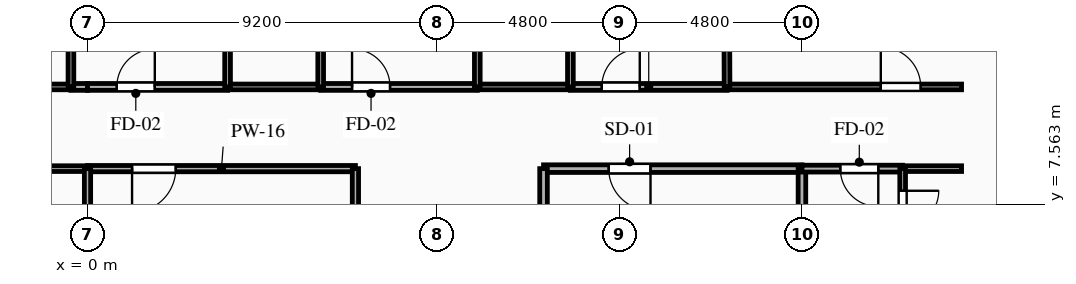
"""IFC4 building model, lengths in metres.
Left out: names, types, materials, properties, quantities, classifications, styles, units other than length and angle.
Written with IfcOpenShell. Run it as: python <this file> out.ifc"""

import sys

from ifc_helpers import new_model, si_unit, direction, frame, frame_2d, origin, place, context, subcontext, project, spatial, rectangle, extrude, element, fill, save


model = new_model("IFC4")
c1 = context("Model", 3, precision=1e-05, world=origin(), true_north=direction((0.0, 1.0)))
c2 = subcontext(c1, "Body", "Model", "MODEL_VIEW")
j1 = project(units=[si_unit("LENGTHUNIT", "METRE"), si_unit("PLANEANGLEUNIT", "RADIAN")], contexts=[c1])
p1 = place(None, origin())
s1 = spatial("IfcSite", under=j1, at=p1, CompositionType="ELEMENT")
p2 = place(p1, origin())
s2 = spatial("IfcBuilding", under=s1, at=p2, CompositionType="ELEMENT")
p3 = place(p2, frame((0.0, 0.0, 82.35)))
s3 = spatial("IfcBuildingStorey", under=s2, at=p3, CompositionType="ELEMENT", Elevation=82.35)
p4 = place(p3, frame((18.8, 8.5, 0.0), z_axis=(0.0, 0.0, 1.0), x_axis=(-1.0, 0.0, 0.0)))
e1 = element("IfcWall", 1, at=p4, inside=s3, PredefinedType="PARTITIONING", context=c2, shape_type="SweptSolid", body=[
    extrude(rectangle(XDim=6.8, YDim=0.2, at=frame_2d((3.4, 0.0))), origin(), (0.0, 0.0, 1.0), 3.045),
])
p5 = place(p4, frame((3.985, 0.0, 0.0)))
e2 = element("IfcOpeningElement", 2, at=p5, cuts=e1, PredefinedType="OPENING", context=c2, shape_type="SweptSolid", body=[
    extrude(rectangle(XDim=1.1, YDim=2.15, at=frame_2d((0.55, 1.075))), frame((0.0, 0.11, 0.0), z_axis=(0.0, -1.0, 0.0), x_axis=(1.0, 0.0, 0.0)), (0.0, 0.0, 1.0), 0.22),
])
p6 = place(p3, frame((12.0, 8.5, 0.0), z_axis=(0.0, 0.0, 1.0), x_axis=(0.0, -1.0, 0.0)))
e3 = element("IfcWall", 3, at=p6, inside=s3, PredefinedType="PARTITIONING", context=c2, shape_type="SweptSolid", body=[
    extrude(rectangle(XDim=2.9, YDim=0.2, at=frame_2d((1.45, 0.0))), origin(), (0.0, 0.0, 1.0), 3.045),
])
p7 = place(p3, frame((18.8, 5.6, 0.0), z_axis=(0.0, 0.0, 1.0), x_axis=(0.0, 1.0, 0.0)))
e4 = element("IfcWall", 4, at=p7, inside=s3, PredefinedType="PARTITIONING", context=c2, shape_type="SweptSolid", body=[
    extrude(rectangle(XDim=2.9, YDim=0.2, at=frame_2d((1.45, 0.0))), origin(), (0.0, 0.0, 1.0), 2.53),
])
p8 = place(p3, frame((-0.436, 10.65, 0.0), z_axis=(0.0, 0.0, 1.0), x_axis=(1.0, 0.0, 0.0)))
e5 = element("IfcWall", 5, at=p8, inside=s3, PredefinedType="PARTITIONING", context=c2, shape_type="SweptSolid", body=[
    extrude(rectangle(XDim=0.436, YDim=0.18, at=frame_2d((0.218, 0.0))), origin(), (0.0, 0.0, 1.0), 3.045),
])
p9 = place(p3, frame((-2.886, 10.65, 0.0), z_axis=(0.0, 0.0, 1.0), x_axis=(1.0, 0.0, 0.0)))
e6 = element("IfcWall", 6, at=p9, inside=s3, PredefinedType="PLUMBINGWALL", context=c2, shape_type="SweptSolid", body=[
    extrude(rectangle(XDim=2.45, YDim=0.15, at=frame_2d((1.225, 0.0))), origin(), (0.0, 0.0, 1.0), 3.045),
])
p10 = place(p3, frame((0.0, 8.5, 0.0), z_axis=(0.0, 0.0, 1.0), x_axis=(-1.0, 0.0, 0.0)))
e7 = element("IfcWall", 7, at=p10, inside=s3, PredefinedType="PARTITIONING", context=c2, shape_type="SweptSolid", body=[
    extrude(rectangle(XDim=7.05, YDim=0.15, at=frame_2d((3.525, 0.0))), origin(), (0.0, 0.0, 1.0), 3.045),
])
p11 = place(p3, frame((21.45, 8.5, 0.0), z_axis=(0.0, 0.0, 1.0), x_axis=(-1.0, 0.0, 0.0)))
e8 = element("IfcWall", 8, at=p11, inside=s3, PredefinedType="PARTITIONING", context=c2, shape_type="SweptSolid", body=[
    extrude(rectangle(XDim=2.65, YDim=0.18, at=frame_2d((1.325, 0.0))), origin(), (0.0, 0.0, 1.0), 3.045),
])
p12 = place(p11, frame((0.641, 0.0, 0.0)))
e9 = element("IfcOpeningElement", 9, at=p12, cuts=e8, PredefinedType="OPENING", context=c2, shape_type="SweptSolid", body=[
    extrude(rectangle(XDim=1.0, YDim=2.15, at=frame_2d((0.5, 1.075))), frame((0.0, 0.1, 0.0), z_axis=(0.0, -1.0, 0.0), x_axis=(1.0, 0.0, 0.0)), (0.0, 0.0, 1.0), 0.2),
])
p13 = place(p3, frame((23.0, 8.5, 0.0), z_axis=(0.0, 0.0, 1.0), x_axis=(-1.0, 0.0, 0.0)))
e10 = element("IfcWall", 10, at=p13, inside=s3, PredefinedType="PARTITIONING", context=c2, shape_type="SweptSolid", body=[
    extrude(rectangle(XDim=1.55, YDim=0.15, at=frame_2d((0.775, 0.0))), origin(), (0.0, 0.0, 1.0), 3.045),
])
p14 = place(p3, frame((0.0, 10.65, 0.0), z_axis=(0.0, 0.0, 1.0), x_axis=(1.0, 0.0, 0.0)))
e11 = element("IfcWall", 11, at=p14, inside=s3, PredefinedType="PARTITIONING", context=c2, shape_type="SweptSolid", body=[
    extrude(rectangle(XDim=3.686, YDim=0.18, at=frame_2d((1.843, 0.0))), origin(), (0.0, 0.0, 1.0), 3.045),
])
p15 = place(p14, frame((0.771, 0.0, 0.0)))
e12 = element("IfcOpeningElement", 12, at=p15, cuts=e11, PredefinedType="OPENING", context=c2, shape_type="SweptSolid", body=[
    extrude(rectangle(XDim=1.0, YDim=2.15, at=frame_2d((0.5, 1.075))), frame((0.0, 0.1, 0.0), z_axis=(0.0, -1.0, 0.0), x_axis=(1.0, 0.0, 0.0)), (0.0, 0.0, 1.0), 0.2),
])
p16 = place(p3, frame((6.136, 10.65, 0.0), z_axis=(0.0, 0.0, 1.0), x_axis=(1.0, 0.0, 0.0)))
e13 = element("IfcWall", 13, at=p16, inside=s3, PredefinedType="PARTITIONING", context=c2, shape_type="SweptSolid", body=[
    extrude(rectangle(XDim=4.121, YDim=0.18, at=frame_2d((2.061, 0.0))), origin(), (0.0, 0.0, 1.0), 3.045),
])
p17 = place(p16, frame((0.825, 0.0, 0.0)))
e14 = element("IfcOpeningElement", 14, at=p17, cuts=e13, PredefinedType="OPENING", context=c2, shape_type="SweptSolid", body=[
    extrude(rectangle(XDim=1.0, YDim=2.15, at=frame_2d((0.5, 1.075))), frame((0.0, 0.1, 0.0), z_axis=(0.0, -1.0, 0.0), x_axis=(1.0, 0.0, 0.0)), (0.0, 0.0, 1.0), 0.2),
])
p18 = place(p3, frame((3.686, 10.65, 0.0), z_axis=(0.0, 0.0, 1.0), x_axis=(1.0, 0.0, 0.0)))
e15 = element("IfcWall", 15, at=p18, inside=s3, PredefinedType="PLUMBINGWALL", context=c2, shape_type="SweptSolid", body=[
    extrude(rectangle(XDim=2.45, YDim=0.15, at=frame_2d((1.225, 0.0))), origin(), (0.0, 0.0, 1.0), 3.045),
])
p19 = place(p3, frame((12.707, 10.65, 0.0), z_axis=(0.0, 0.0, 1.0), x_axis=(1.0, 0.0, 0.0)))
e16 = element("IfcWall", 16, at=p19, inside=s3, PredefinedType="PARTITIONING", context=c2, shape_type="SweptSolid", body=[
    extrude(rectangle(XDim=4.122, YDim=0.18, at=frame_2d((2.061, 0.0))), origin(), (0.0, 0.0, 1.0), 3.045),
])
p20 = place(p19, frame((0.825, 0.0, 0.0)))
e17 = element("IfcOpeningElement", 17, at=p20, cuts=e16, PredefinedType="OPENING", context=c2, shape_type="SweptSolid", body=[
    extrude(rectangle(XDim=1.0, YDim=2.15, at=frame_2d((0.5, 1.075))), frame((0.0, 0.1, 0.0), z_axis=(0.0, -1.0, 0.0), x_axis=(1.0, 0.0, 0.0)), (0.0, 0.0, 1.0), 0.2),
])
p21 = place(p3, frame((10.257, 10.65, 0.0), z_axis=(0.0, 0.0, 1.0), x_axis=(1.0, 0.0, 0.0)))
e18 = element("IfcWall", 18, at=p21, inside=s3, PredefinedType="PLUMBINGWALL", context=c2, shape_type="SweptSolid", body=[
    extrude(rectangle(XDim=2.45, YDim=0.15, at=frame_2d((1.225, 0.0))), origin(), (0.0, 0.0, 1.0), 3.045),
])
p22 = place(p3, frame((16.829, 10.65, 0.0), z_axis=(0.0, 0.0, 1.0), x_axis=(1.0, 0.0, 0.0)))
e19 = element("IfcWall", 19, at=p22, inside=s3, PredefinedType="PARTITIONING", context=c2, shape_type="SweptSolid", body=[
    extrude(rectangle(XDim=6.171, YDim=0.15, at=frame_2d((3.085, 0.0))), origin(), (0.0, 0.0, 1.0), 3.045),
])
p23 = place(p22, frame((4.046, 0.0, 0.0)))
e20 = element("IfcOpeningElement", 20, at=p23, cuts=e19, PredefinedType="OPENING", context=c2, shape_type="SweptSolid", body=[
    extrude(rectangle(XDim=1.05, YDim=2.15, at=frame_2d((0.525, 1.075))), frame((0.0, 0.085, 0.0), z_axis=(0.0, -1.0, 0.0), x_axis=(1.0, 0.0, 0.0)), (0.0, 0.0, 1.0), 0.17),
])
p24 = place(p3, frame((7.05, 8.5, 0.0), z_axis=(0.0, 0.0, 1.0), x_axis=(-1.0, 0.0, 0.0)))
e21 = element("IfcWall", 21, at=p24, inside=s3, PredefinedType="PARTITIONING", context=c2, shape_type="SweptSolid", body=[
    extrude(rectangle(XDim=7.05, YDim=0.165, at=frame_2d((3.525, 0.0))), origin(), (0.0, 0.0, 1.0), 3.045),
])
p25 = place(p24, frame((4.728, 0.0, 0.0)))
e22 = element("IfcOpeningElement", 22, at=p25, cuts=e21, PredefinedType="OPENING", context=c2, shape_type="SweptSolid", body=[
    extrude(rectangle(XDim=1.15, YDim=2.15, at=frame_2d((0.575, 1.075))), frame((0.0, 0.093, 0.0), z_axis=(0.0, -1.0, 0.0), x_axis=(1.0, 0.0, 0.0)), (0.0, 0.0, 1.0), 0.185),
])
p26 = place(p3, frame((7.05, 1.45, 0.0), z_axis=(0.0, 0.0, 1.0), x_axis=(0.0, 1.0, 0.0)))
e23 = element("IfcWall", 23, at=p26, inside=s3, PredefinedType="PARTITIONING", context=c2, shape_type="SweptSolid", body=[
    extrude(rectangle(XDim=7.05, YDim=0.165, at=frame_2d((3.525, 0.0))), origin(), (0.0, 0.0, 1.0), 3.045),
])
p27 = place(p3, frame((21.45, 8.5, 0.0), z_axis=(0.0, 0.0, 1.0), x_axis=(0.0, -1.0, 0.0)))
e24 = element("IfcWall", 24, at=p27, inside=s3, PredefinedType="PARTITIONING", context=c2, shape_type="SweptSolid", body=[
    extrude(rectangle(XDim=2.115, YDim=0.15, at=frame_2d((1.058, 0.0))), origin(), (0.0, 0.0, 1.0), 3.045),
])
p28 = place(p27, frame((0.583, 0.0, 0.0)))
e25 = element("IfcOpeningElement", 25, at=p28, cuts=e24, PredefinedType="OPENING", context=c2, shape_type="SweptSolid", body=[
    extrude(rectangle(XDim=0.95, YDim=2.1, at=frame_2d((0.475, 1.05))), frame((0.0, 0.085, 0.0), z_axis=(0.0, -1.0, 0.0), x_axis=(1.0, 0.0, 0.0)), (0.0, 0.0, 1.0), 0.17),
])
for number, where, z_axis, x_axis in (
    (26, (-0.436, 10.65, 0.0), (0.0, 0.0, 1.0), (0.0, 1.0, 0.0)),
    (27, (3.686, 12.8, 0.0), (0.0, 0.0, 1.0), (0.0, -1.0, 0.0)),
    (28, (6.136, 10.65, 0.0), (0.0, 0.0, 1.0), (0.0, 1.0, 0.0)),
    (29, (10.257, 12.8, 0.0), (0.0, 0.0, 1.0), (0.0, -1.0, 0.0)),
    (30, (12.707, 10.65, 0.0), (0.0, 0.0, 1.0), (0.0, 1.0, 0.0)),
):
    element("IfcWall", number, at=place(p3, frame(where, z_axis=z_axis, x_axis=x_axis)), inside=s3, PredefinedType="PLUMBINGWALL", context=c2, shape_type="SweptSolid", body=[
        extrude(rectangle(XDim=2.15, YDim=0.15, at=frame_2d((1.075, 0.0))), origin(), (0.0, 0.0, 1.0), 3.045),
    ])
p29 = place(p3, frame((16.785, 22.199, 0.0), z_axis=(0.0, 0.0, 1.0), x_axis=(0.003805067053, -0.999992760706, 0.0)))
e31 = element("IfcWall", 31, at=p29, inside=s3, PredefinedType="PARTITIONING", context=c2, shape_type="SweptSolid", body=[
    extrude(rectangle(XDim=11.549, YDim=0.15, at=frame_2d((5.774, 0.0))), origin(), (0.0, 0.0, 1.0), 3.045),
])
p30 = place(p3, frame((0.0, 8.5, 0.0), z_axis=(0.0, 0.0, 1.0), x_axis=(0.0, -1.0, 0.0)))
e32 = element("IfcWall", 32, at=p30, inside=s3, PredefinedType="PARTITIONING", context=c2, shape_type="SweptSolid", body=[
    extrude(rectangle(XDim=7.05, YDim=0.165, at=frame_2d((3.525, 0.0))), origin(), (0.0, 0.0, 1.0), 3.045),
])
p31 = place(p5, origin())
e33 = element("IfcDoor", 33, at=p31, inside=s3, OperationType="SINGLE_SWING_LEFT", PredefinedType="DOOR", context=c2, shape_type="SweptSolid", body=[
    extrude(rectangle(XDim=1.1, YDim=2.15, at=frame_2d((0.55, 1.075))), frame((0.0, 0.025, 0.0), z_axis=(0.0, -1.0, 0.0), x_axis=(1.0, 0.0, 0.0)), (0.0, 0.0, 1.0), 0.05),
])
fill(e2, e33)
p32 = place(p12, origin())
e34 = element("IfcDoor", 34, at=p32, inside=s3, OperationType="SINGLE_SWING_LEFT", PredefinedType="DOOR", context=c2, shape_type="SweptSolid", body=[
    extrude(rectangle(XDim=1.0, YDim=2.15, at=frame_2d((0.5, 1.075))), frame((0.0, 0.025, 0.0), z_axis=(0.0, -1.0, 0.0), x_axis=(1.0, 0.0, 0.0)), (0.0, 0.0, 1.0), 0.05),
])
fill(e9, e34)
p33 = place(p15, origin())
e35 = element("IfcDoor", 35, at=p33, inside=s3, OperationType="SINGLE_SWING_RIGHT", PredefinedType="DOOR", context=c2, shape_type="SweptSolid", body=[
    extrude(rectangle(XDim=1.0, YDim=2.15, at=frame_2d((0.5, 1.075))), frame((0.0, 0.025, 0.0), z_axis=(0.0, -1.0, 0.0), x_axis=(1.0, 0.0, 0.0)), (0.0, 0.0, 1.0), 0.05),
])
fill(e12, e35)
p34 = place(p17, origin())
e36 = element("IfcDoor", 36, at=p34, inside=s3, OperationType="SINGLE_SWING_LEFT", PredefinedType="DOOR", context=c2, shape_type="SweptSolid", body=[
    extrude(rectangle(XDim=1.0, YDim=2.15, at=frame_2d((0.5, 1.075))), frame((0.0, 0.025, 0.0), z_axis=(0.0, -1.0, 0.0), x_axis=(1.0, 0.0, 0.0)), (0.0, 0.0, 1.0), 0.05),
])
fill(e14, e36)
p35 = place(p20, origin())
e37 = element("IfcDoor", 37, at=p35, inside=s3, OperationType="SINGLE_SWING_RIGHT", PredefinedType="DOOR", context=c2, shape_type="SweptSolid", body=[
    extrude(rectangle(XDim=1.0, YDim=2.15, at=frame_2d((0.5, 1.075))), frame((0.0, 0.025, 0.0), z_axis=(0.0, -1.0, 0.0), x_axis=(1.0, 0.0, 0.0)), (0.0, 0.0, 1.0), 0.05),
])
fill(e17, e37)
p36 = place(p23, origin())
e38 = element("IfcDoor", 38, at=p36, inside=s3, OperationType="SINGLE_SWING_LEFT", PredefinedType="DOOR", context=c2, shape_type="SweptSolid", body=[
    extrude(rectangle(XDim=1.05, YDim=2.15, at=frame_2d((0.525, 1.075))), frame((0.0, 0.025, 0.0), z_axis=(0.0, -1.0, 0.0), x_axis=(1.0, 0.0, 0.0)), (0.0, 0.0, 1.0), 0.05),
])
fill(e20, e38)
p37 = place(p25, origin())
e39 = element("IfcDoor", 39, at=p37, inside=s3, OperationType="SINGLE_SWING_RIGHT", PredefinedType="DOOR", context=c2, shape_type="SweptSolid", body=[
    extrude(rectangle(XDim=1.15, YDim=2.15, at=frame_2d((0.575, 1.075))), frame((0.0, 0.025, 0.0), z_axis=(0.0, -1.0, 0.0), x_axis=(1.0, 0.0, 0.0)), (0.0, 0.0, 1.0), 0.05),
])
fill(e22, e39)
p38 = place(p28, origin())
e40 = element("IfcDoor", 40, at=p38, inside=s3, OperationType="SINGLE_SWING_LEFT", PredefinedType="DOOR", context=c2, shape_type="SweptSolid", body=[
    extrude(rectangle(XDim=0.95, YDim=2.1, at=frame_2d((0.475, 1.05))), frame((0.0, 0.025, 0.0), z_axis=(0.0, -1.0, 0.0), x_axis=(1.0, 0.0, 0.0)), (0.0, 0.0, 1.0), 0.05),
])
fill(e25, e40)
save(model, sys.argv[1])
